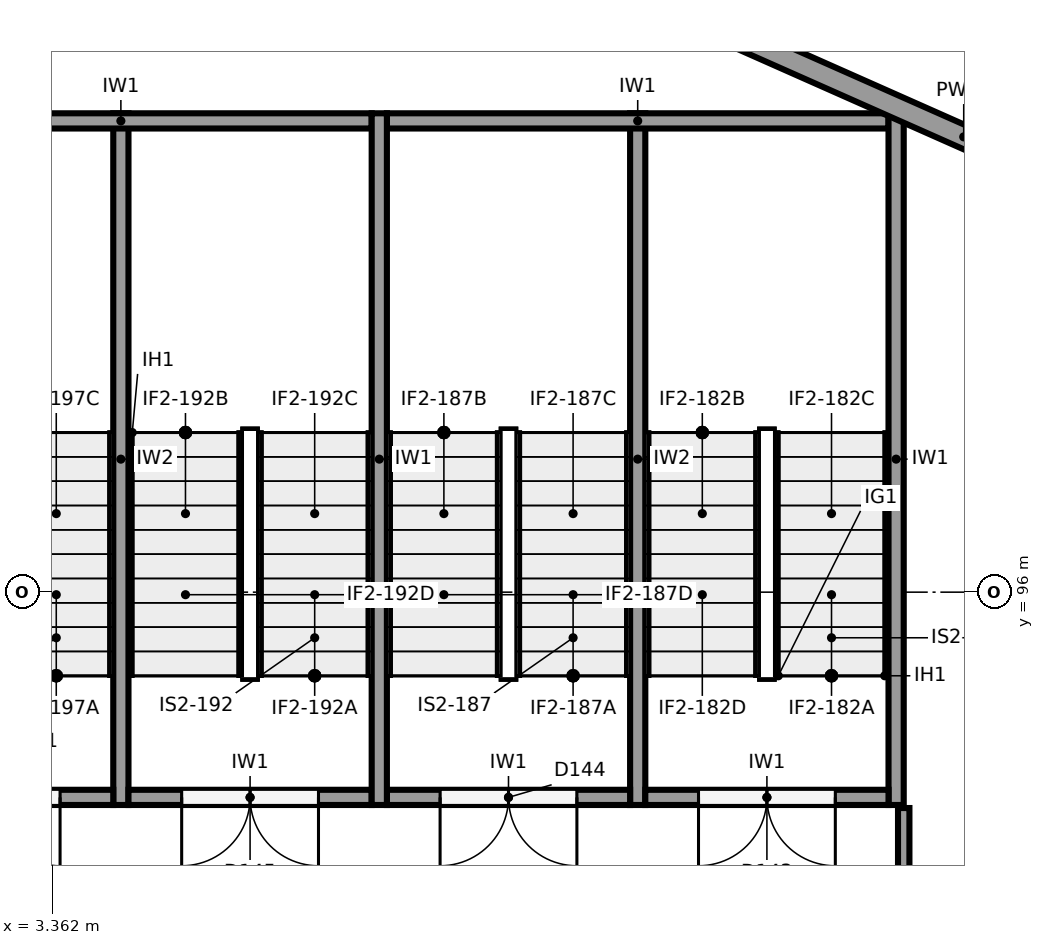
"""IFC4 building model, lengths in metres.
Left out: names, types, materials, properties, quantities, classifications, styles, units other than length and angle.
Written with IfcOpenShell. Run it as: python <this file> out.ifc"""

import sys

from ifc_helpers import new_model, si_unit, direction, frame, frame_2d, origin, place, context, subcontext, project, spatial, rectangle, extrude, element, fill, save


model = new_model("IFC4")
c1 = context("Model", 3, precision=1e-05, world=origin(), true_north=direction((0.0, 1.0)))
c2 = subcontext(c1, "Body", "Model", "MODEL_VIEW")
j1 = project(units=[si_unit("LENGTHUNIT", "METRE"), si_unit("PLANEANGLEUNIT", "RADIAN")], contexts=[c1])
p1 = place(None, origin())
s1 = spatial("IfcSite", under=j1, at=p1, CompositionType="ELEMENT")
p2 = place(p1, origin())
s2 = spatial("IfcBuilding", under=s1, at=p2, CompositionType="ELEMENT")
p3 = place(p2, origin())
s3 = spatial("IfcBuildingStorey", under=s2, at=p3, CompositionType="ELEMENT", Elevation=0.0)
p4 = place(p3, frame((8.123, 105.198, 0.0), z_axis=(0.0, 0.0, 1.0), x_axis=(0.914138897099, -0.405401130748, 0.0)))
e1 = element("IfcWall", 1, at=p4, inside=s3, PredefinedType="SOLIDWALL", context=c2, shape_type="SweptSolid", body=[
    extrude(rectangle(XDim=15.824, YDim=0.3, at=frame_2d((7.912, 0.0))), origin(), (0.0, 0.0, 1.0), 4.85),
])
p5 = place(p4, frame((11.574, 0.0, 0.0)))
e2 = element("IfcOpeningElement", 2, at=p5, cuts=e1, PredefinedType="OPENING", context=c2, shape_type="SweptSolid", body=[
    extrude(rectangle(XDim=1.8, YDim=2.4, at=frame_2d((0.9, 1.2))), frame((0.0, 0.16, 0.0), z_axis=(0.0, -1.0, 0.0), x_axis=(1.0, 0.0, 0.0)), (0.0, 0.0, 1.0), 0.32),
])
p6 = place(p3, frame((-7.256, 98.782, 0.0), z_axis=(0.0, 0.0, 1.0), x_axis=(0.914136361455, 0.405406848322, 0.0)))
e3 = element("IfcWall", 3, at=p6, inside=s3, PredefinedType="SOLIDWALL", context=c2, shape_type="SweptSolid", body=[
    extrude(rectangle(XDim=15.824, YDim=0.35, at=frame_2d((7.912, 0.0))), origin(), (0.0, 0.0, 1.0), 4.85),
])
for number, where, z_axis, x_axis in (
    (4, (14.467, 102.3, 0.0), (0.0, 0.0, 1.0), (0.0, -1.0, 0.0)),
    (5, (7.667, 102.3, 0.0), (0.0, 0.0, 1.0), (0.0, -1.0, 0.0)),
):
    element("IfcWall", number, at=place(p3, frame(where, z_axis=z_axis, x_axis=x_axis)), inside=s3, PredefinedType="SHEAR", context=c2, shape_type="SweptSolid", body=[
        extrude(rectangle(XDim=9.1, YDim=0.2, at=frame_2d((4.55, 0.0))), origin(), (0.0, 0.0, 1.0), 6.15),
    ])
p7 = place(p3, frame((14.367, 102.2, 0.0), z_axis=(0.0, 0.0, 1.0), x_axis=(-1.0, 0.0, 0.0)))
e6 = element("IfcWall", 6, at=p7, inside=s3, PredefinedType="SHEAR", context=c2, shape_type="SweptSolid", body=[
    extrude(rectangle(XDim=6.6, YDim=0.2, at=frame_2d((3.3, 0.0))), origin(), (0.0, 0.0, 1.0), 6.15),
])
p8 = place(p3, frame((7.567, 102.2, 0.0), z_axis=(0.0, 0.0, 1.0), x_axis=(-1.0, 0.0, 0.0)))
e7 = element("IfcWall", 7, at=p8, inside=s3, PredefinedType="SHEAR", context=c2, shape_type="SweptSolid", body=[
    extrude(rectangle(XDim=6.6, YDim=0.2, at=frame_2d((3.3, 0.0))), origin(), (0.0, 0.0, 1.0), 6.15),
])
for number, where, z_axis, x_axis in (
    (8, (11.067, 102.3, 0.0), (0.0, 0.0, 1.0), (0.0, -1.0, 0.0)),
    (9, (4.267, 102.3, 0.0), (0.0, 0.0, 1.0), (0.0, -1.0, 0.0)),
):
    element("IfcWall", number, at=place(p3, frame(where, z_axis=z_axis, x_axis=x_axis)), inside=s3, PredefinedType="SHEAR", context=c2, shape_type="SweptSolid", body=[
        extrude(rectangle(XDim=9.1, YDim=0.2, at=frame_2d((4.55, 0.0))), origin(), (0.0, 0.0, 1.0), 6.15),
    ])
p9 = place(p3, frame((14.367, 93.3, 0.0), z_axis=(0.0, 0.0, 1.0), x_axis=(-1.0, 0.0, 0.0)))
e10 = element("IfcWall", 10, at=p9, inside=s3, PredefinedType="SHEAR", context=c2, shape_type="SweptSolid", body=[
    extrude(rectangle(XDim=3.2, YDim=0.2, at=frame_2d((1.6, 0.0))), origin(), (0.0, 0.0, 1.0), 6.15),
])
p10 = place(p9, frame((0.7, 0.0, 0.0)))
e11 = element("IfcOpeningElement", 11, at=p10, cuts=e10, PredefinedType="OPENING", context=c2, shape_type="SweptSolid", body=[
    extrude(rectangle(XDim=1.8, YDim=2.1, at=frame_2d((0.9, 1.05))), frame((0.0, 0.11, 0.0), z_axis=(0.0, -1.0, 0.0), x_axis=(1.0, 0.0, 0.0)), (0.0, 0.0, 1.0), 0.22),
])
p11 = place(p3, frame((10.967, 93.3, 0.0), z_axis=(0.0, 0.0, 1.0), x_axis=(-1.0, 0.0, 0.0)))
e12 = element("IfcWall", 12, at=p11, inside=s3, PredefinedType="SHEAR", context=c2, shape_type="SweptSolid", body=[
    extrude(rectangle(XDim=3.2, YDim=0.2, at=frame_2d((1.6, 0.0))), origin(), (0.0, 0.0, 1.0), 6.15),
])
p12 = place(p11, frame((0.7, 0.0, 0.0)))
e13 = element("IfcOpeningElement", 13, at=p12, cuts=e12, PredefinedType="OPENING", context=c2, shape_type="SweptSolid", body=[
    extrude(rectangle(XDim=1.8, YDim=2.1, at=frame_2d((0.9, 1.05))), frame((0.0, 0.11, 0.0), z_axis=(0.0, -1.0, 0.0), x_axis=(1.0, 0.0, 0.0)), (0.0, 0.0, 1.0), 0.22),
])
p13 = place(p3, frame((7.567, 93.3, 0.0), z_axis=(0.0, 0.0, 1.0), x_axis=(-1.0, 0.0, 0.0)))
e14 = element("IfcWall", 14, at=p13, inside=s3, PredefinedType="SHEAR", context=c2, shape_type="SweptSolid", body=[
    extrude(rectangle(XDim=3.2, YDim=0.2, at=frame_2d((1.6, 0.0))), origin(), (0.0, 0.0, 1.0), 6.15),
])
p14 = place(p13, frame((0.7, 0.0, 0.0)))
e15 = element("IfcOpeningElement", 15, at=p14, cuts=e14, PredefinedType="OPENING", context=c2, shape_type="SweptSolid", body=[
    extrude(rectangle(XDim=1.8, YDim=2.1, at=frame_2d((0.9, 1.05))), frame((0.0, 0.11, 0.0), z_axis=(0.0, -1.0, 0.0), x_axis=(1.0, 0.0, 0.0)), (0.0, 0.0, 1.0), 0.22),
])
p15 = place(p3, frame((4.167, 93.3, 0.0), z_axis=(0.0, 0.0, 1.0), x_axis=(-1.0, 0.0, 0.0)))
e16 = element("IfcWall", 16, at=p15, inside=s3, PredefinedType="SHEAR", context=c2, shape_type="SweptSolid", body=[
    extrude(rectangle(XDim=3.2, YDim=0.2, at=frame_2d((1.6, 0.0))), origin(), (0.0, 0.0, 1.0), 6.15),
])
p16 = place(p15, frame((0.7, 0.0, 0.0)))
e17 = element("IfcOpeningElement", 17, at=p16, cuts=e16, PredefinedType="OPENING", context=c2, shape_type="SweptSolid", body=[
    extrude(rectangle(XDim=1.8, YDim=2.1, at=frame_2d((0.9, 1.05))), frame((0.0, 0.11, 0.0), z_axis=(0.0, -1.0, 0.0), x_axis=(1.0, 0.0, 0.0)), (0.0, 0.0, 1.0), 0.22),
])
p17 = place(p3, frame((14.567, 90.366, 0.0), z_axis=(0.0, 0.0, 1.0), x_axis=(0.0, 1.0, 0.0)))
e18 = element("IfcWall", 18, at=p17, inside=s3, PredefinedType="PARTITIONING", context=c2, shape_type="SweptSolid", body=[
    extrude(rectangle(XDim=2.793, YDim=0.15, at=frame_2d((1.397, 0.0))), origin(), (0.0, 0.0, 1.0), 6.15),
])
p18 = place(p3, frame((21.206, 102.896, 0.0), z_axis=(0.0, 0.0, 1.0), x_axis=(-0.914139488504, 0.405399797184, 0.0)))
e19 = element("IfcWall", 19, at=p18, inside=s3, PredefinedType="PARTITIONING", context=c2, shape_type="SweptSolid", body=[
    extrude(rectangle(XDim=14.232, YDim=0.15, at=frame_2d((7.116, 0.0))), origin(), (0.0, 0.0, 1.0), 4.85),
])
p19 = place(p10, origin())
e20 = element("IfcDoor", 20, at=p19, inside=s3, OperationType="DOUBLE_DOOR_SINGLE_SWING", PredefinedType="DOOR", context=c2, shape_type="SweptSolid", body=[
    extrude(rectangle(XDim=1.8, YDim=2.1, at=frame_2d((0.9, 1.05))), frame((0.0, 0.025, 0.0), z_axis=(0.0, -1.0, 0.0), x_axis=(1.0, 0.0, 0.0)), (0.0, 0.0, 1.0), 0.05),
])
fill(e11, e20)
p20 = place(p12, origin())
e21 = element("IfcDoor", 21, at=p20, inside=s3, OperationType="DOUBLE_DOOR_SINGLE_SWING", PredefinedType="DOOR", context=c2, shape_type="SweptSolid", body=[
    extrude(rectangle(XDim=1.8, YDim=2.1, at=frame_2d((0.9, 1.05))), frame((0.0, 0.025, 0.0), z_axis=(0.0, -1.0, 0.0), x_axis=(1.0, 0.0, 0.0)), (0.0, 0.0, 1.0), 0.05),
])
fill(e13, e21)
p21 = place(p14, origin())
e22 = element("IfcDoor", 22, at=p21, inside=s3, OperationType="DOUBLE_DOOR_SINGLE_SWING", PredefinedType="DOOR", context=c2, shape_type="SweptSolid", body=[
    extrude(rectangle(XDim=1.8, YDim=2.1, at=frame_2d((0.9, 1.05))), frame((0.0, 0.025, 0.0), z_axis=(0.0, -1.0, 0.0), x_axis=(1.0, 0.0, 0.0)), (0.0, 0.0, 1.0), 0.05),
])
fill(e15, e22)
p22 = place(p16, origin())
e23 = element("IfcDoor", 23, at=p22, inside=s3, OperationType="DOUBLE_DOOR_SINGLE_SWING", PredefinedType="DOOR", context=c2, shape_type="SweptSolid", body=[
    extrude(rectangle(XDim=1.8, YDim=2.1, at=frame_2d((0.9, 1.05))), frame((0.0, 0.025, 0.0), z_axis=(0.0, -1.0, 0.0), x_axis=(1.0, 0.0, 0.0)), (0.0, 0.0, 1.0), 0.05),
])
fill(e17, e23)
save(model, sys.argv[1])
